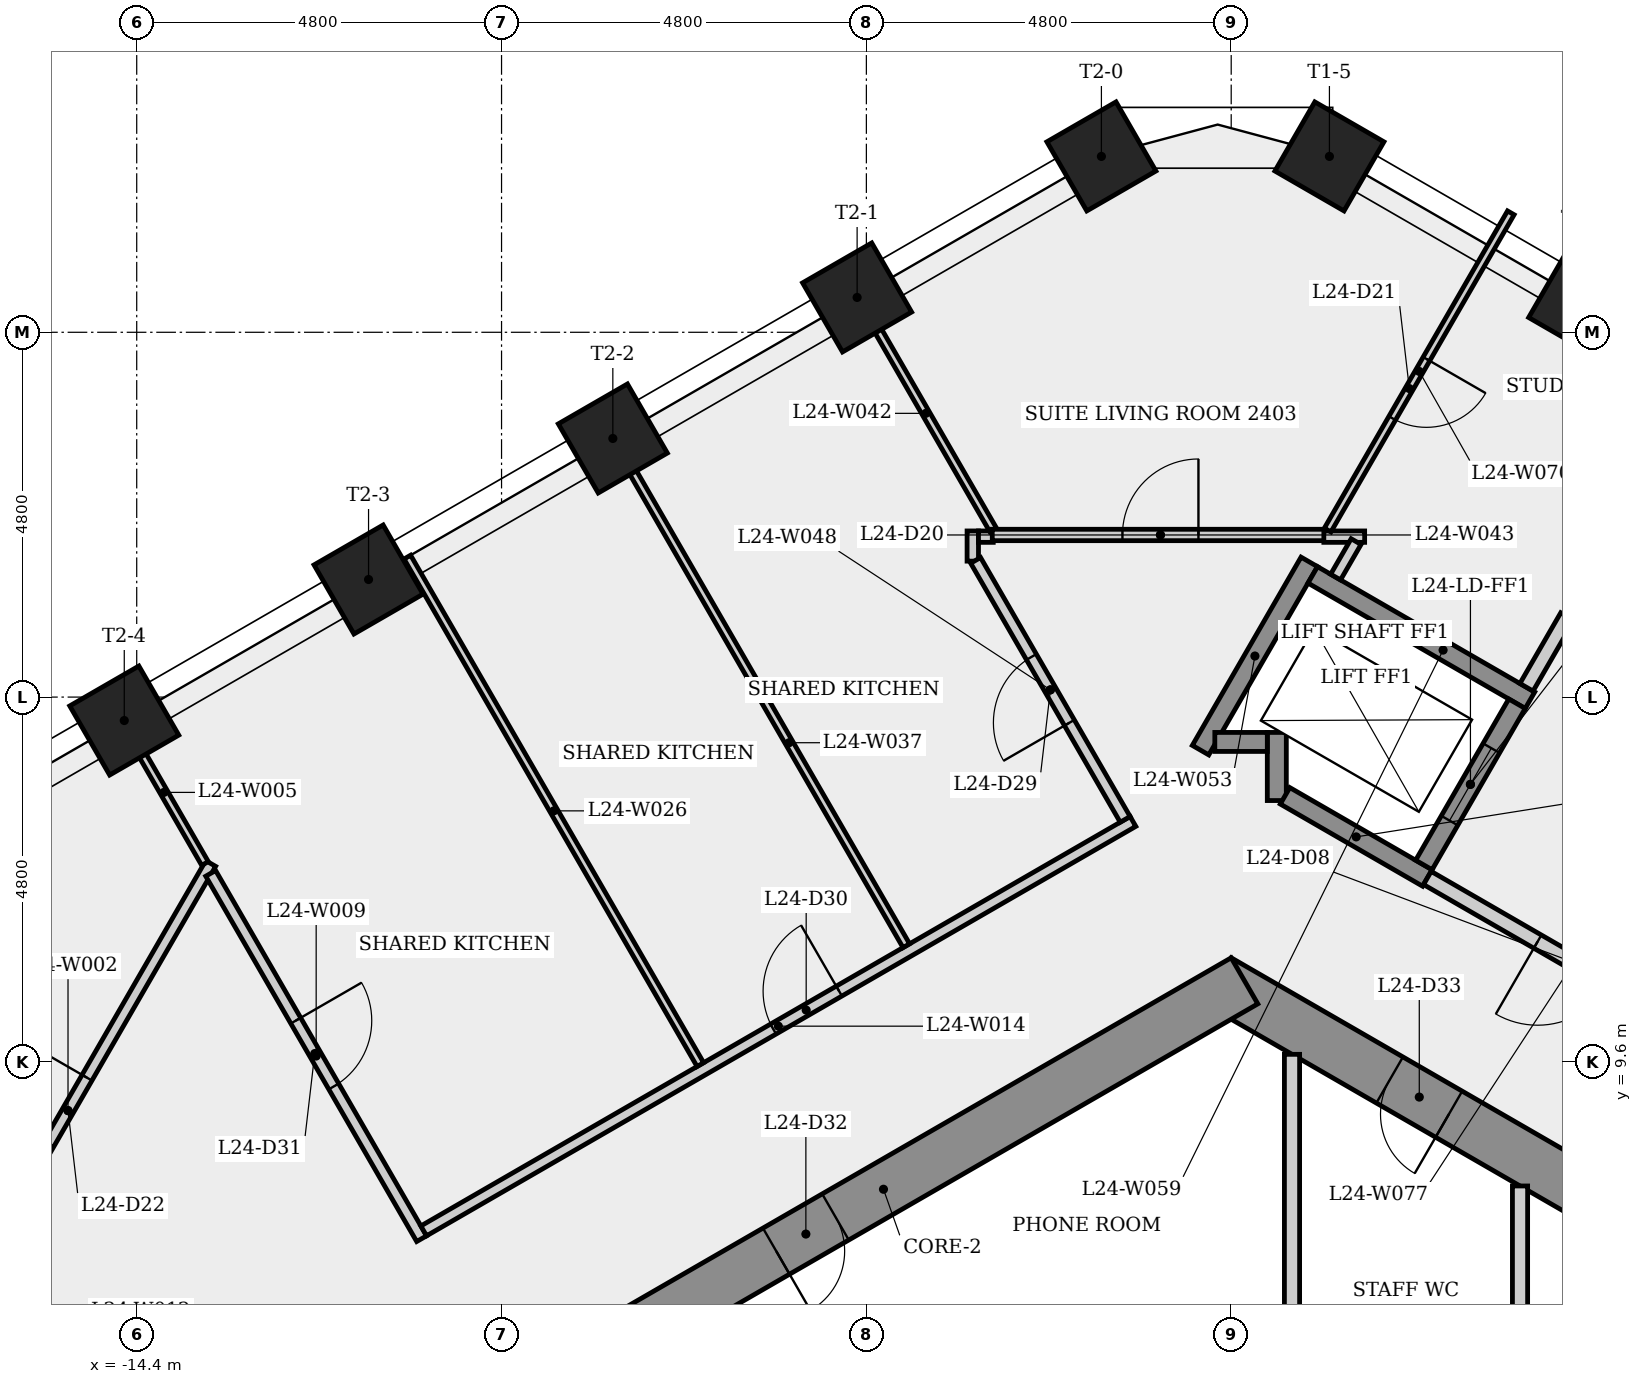
"""IFC4 building model, lengths in metres.
Left out: names, types, materials, properties, quantities, classifications, styles, units other than length and angle.
Written with IfcOpenShell. Run it as: python <this file> out.ifc"""

import sys

from ifc_helpers import new_model, si_unit, direction, frame, frame_2d, origin, origin_2d, place, context, subcontext, project, spatial, rectangle, extrude, element, fill, save


model = new_model("IFC4")
c1 = context("Model", 3, precision=1e-05, world=origin(), true_north=direction((0.0, 1.0)))
c2 = subcontext(c1, "Body", "Model", "MODEL_VIEW")
j1 = project(units=[si_unit("LENGTHUNIT", "METRE"), si_unit("PLANEANGLEUNIT", "RADIAN")], contexts=[c1])
p1 = place(None, origin())
s1 = spatial("IfcSite", under=j1, at=p1, CompositionType="ELEMENT")
p2 = place(p1, origin())
s2 = spatial("IfcBuilding", under=s1, at=p2, CompositionType="ELEMENT")
p3 = place(p2, frame((0.0, 0.0, 93.3)))
s3 = spatial("IfcBuildingStorey", under=s2, at=p3, CompositionType="ELEMENT", Elevation=93.3)
p4 = place(p3, frame((9.325, 5.182, 0.0), z_axis=(0.0, 0.0, 1.0), x_axis=(-0.866023993627, 0.500002442456, 0.0)))
e1 = element("IfcWall", 1, at=p4, inside=s3, PredefinedType="SHEAR", context=c2, shape_type="SweptSolid", body=[
    extrude(rectangle(XDim=10.97, YDim=0.7, at=frame_2d((5.485, 0.0))), origin(), (0.0, 0.0, 1.0), 3.4),
])
p5 = place(p4, frame((7.46, 0.0, 0.0)))
e2 = element("IfcOpeningElement", 2, at=p5, cuts=e1, PredefinedType="OPENING", context=c2, shape_type="SweptSolid", body=[
    extrude(rectangle(XDim=0.9, YDim=2.1, at=frame_2d((0.45, 1.05))), frame((0.0, 0.36, 0.0), z_axis=(0.0, -1.0, 0.0), x_axis=(1.0, 0.0, 0.0)), (0.0, 0.0, 1.0), 0.72),
])
p6 = place(p4, frame((1.201, 0.0, 0.0)))
e3 = element("IfcOpeningElement", 3, at=p6, cuts=e1, PredefinedType="OPENING", context=c2, shape_type="SweptSolid", body=[
    extrude(rectangle(XDim=0.9, YDim=2.1, at=frame_2d((0.45, 1.05))), frame((0.0, 0.36, 0.0), z_axis=(0.0, -1.0, 0.0), x_axis=(1.0, 0.0, 0.0)), (0.0, 0.0, 1.0), 0.72),
])
p7 = place(p3, frame((0.175, 10.667, 0.0), z_axis=(0.0, 0.0, 1.0), x_axis=(-0.866023993627, -0.500002442456, 0.0)))
e4 = element("IfcWall", 4, at=p7, inside=s3, PredefinedType="SHEAR", context=c2, shape_type="SweptSolid", body=[
    extrude(rectangle(XDim=10.97, YDim=0.7, at=frame_2d((5.485, 0.0))), origin(), (0.0, 0.0, 1.0), 3.4),
])
p8 = place(p7, frame((6.214, 0.0, 0.0)))
e5 = element("IfcOpeningElement", 5, at=p8, cuts=e4, PredefinedType="OPENING", context=c2, shape_type="SweptSolid", body=[
    extrude(rectangle(XDim=0.9, YDim=2.1, at=frame_2d((0.45, 1.05))), frame((0.0, 0.36, 0.0), z_axis=(0.0, -1.0, 0.0), x_axis=(1.0, 0.0, 0.0)), (0.0, 0.0, 1.0), 0.72),
])
for number, where, z_axis, x_axis in (
    (6, (4.631, 19.586, 0.0), (0.0, 0.0, 1.0), (0.5, 0.866, 0.0)),
    (7, (1.292, 21.514, 0.0), (0.0, 0.0, 1.0), (0.5, 0.866, 0.0)),
    (8, (-1.708, 21.514, 0.0), (0.0, 0.0, 1.0), (-0.5, 0.866, 0.0)),
    (9, (-4.922, 19.658, 0.0), (0.0, 0.0, 1.0), (-0.5, 0.866, 0.0)),
    (10, (-8.136, 17.803, 0.0), (0.0, 0.0, 1.0), (-0.5, 0.866, 0.0)),
    (11, (-11.35, 15.947, 0.0), (0.0, 0.0, 1.0), (-0.5, 0.866, 0.0)),
    (12, (-14.564, 14.092, 0.0), (0.0, 0.0, 1.0), (-0.5, 0.866, 0.0)),
):
    element("IfcColumn", number, at=place(p3, frame(where, z_axis=z_axis, x_axis=x_axis)), inside=s3, PredefinedType="COLUMN", context=c2, shape_type="SweptSolid", body=[
        extrude(rectangle(XDim=1.05, YDim=1.05, at=origin_2d()), origin(), (0.0, 0.0, 1.0), 3.4),
    ])
p9 = place(p3, frame((-17.181, 5.708, 0.0), z_axis=(0.0, 0.0, 1.0), x_axis=(0.50000294753, 0.86602370202, 0.0)))
e13 = element("IfcWall", 13, at=p9, inside=s3, PredefinedType="PARTITIONING", context=c2, shape_type="SweptSolid", body=[
    extrude(rectangle(XDim=7.509, YDim=0.15, at=frame_2d((3.755, 0.0))), origin(), (0.0, 0.0, 1.0), 3.05),
])
p10 = place(p9, frame((3.255, 0.0, 0.0)))
e14 = element("IfcOpeningElement", 14, at=p10, cuts=e13, PredefinedType="OPENING", context=c2, shape_type="SweptSolid", body=[
    extrude(rectangle(XDim=1.0, YDim=2.1, at=frame_2d((0.5, 1.05))), frame((0.0, 0.085, 0.0), z_axis=(0.0, -1.0, 0.0), x_axis=(1.0, 0.0, 0.0)), (0.0, 0.0, 1.0), 0.17),
])
p11 = place(p3, frame((-14.582, 14.081, 0.0), z_axis=(0.0, 0.0, 1.0), x_axis=(0.49994423739, -0.866057595949, 0.0)))
e15 = element("IfcWall", 15, at=p11, inside=s3, PredefinedType="PARTITIONING", context=c2, shape_type="SweptSolid", body=[
    extrude(rectangle(XDim=2.16, YDim=0.1, at=frame_2d((1.08, 0.0))), origin(), (0.0, 0.0, 1.0), 3.05),
])
p12 = place(p3, frame((-13.427, 12.081, 0.0), z_axis=(0.0, 0.0, 1.0), x_axis=(0.499966127528, -0.866044959182, 0.0)))
e16 = element("IfcWall", 16, at=p12, inside=s3, PredefinedType="PARTITIONING", context=c2, shape_type="SweptSolid", body=[
    extrude(rectangle(XDim=5.551, YDim=0.15, at=frame_2d((2.775, 0.0))), origin(), (0.0, 0.0, 1.0), 3.05),
])
p13 = place(p12, frame((2.238, 0.0, 0.0)))
e17 = element("IfcOpeningElement", 17, at=p13, cuts=e16, PredefinedType="OPENING", context=c2, shape_type="SweptSolid", body=[
    extrude(rectangle(XDim=1.0, YDim=2.1, at=frame_2d((0.5, 1.05))), frame((0.0, 0.085, 0.0), z_axis=(0.0, -1.0, 0.0), x_axis=(1.0, 0.0, 0.0)), (0.0, 0.0, 1.0), 0.17),
])
p14 = place(p3, frame((-10.624, 7.376, 0.0), z_axis=(0.0, 0.0, 1.0), x_axis=(0.86602446816, 0.500001620546, 0.0)))
e18 = element("IfcWall", 18, at=p14, inside=s3, PredefinedType="PARTITIONING", context=c2, shape_type="SweptSolid", body=[
    extrude(rectangle(XDim=10.775, YDim=0.15, at=frame_2d((5.387, 0.0))), origin(), (0.0, 0.0, 1.0), 3.05),
])
p15 = place(p14, frame((5.31, 0.0, 0.0)))
e19 = element("IfcOpeningElement", 19, at=p15, cuts=e18, PredefinedType="OPENING", context=c2, shape_type="SweptSolid", body=[
    extrude(rectangle(XDim=1.0, YDim=2.1, at=frame_2d((0.5, 1.05))), frame((0.0, 0.085, 0.0), z_axis=(0.0, -1.0, 0.0), x_axis=(1.0, 0.0, 0.0)), (0.0, 0.0, 1.0), 0.17),
])
for number, where, z_axis, x_axis in (
    (20, (-6.984, 9.564, 0.0), (0.0, 0.0, 1.0), (-0.5, 0.866, 0.0)),
    (21, (-4.275, 11.129, 0.0), (0.0, 0.0, 1.0), (-0.5, 0.866, 0.0)),
):
    element("IfcWall", number, at=place(p3, frame(where, z_axis=z_axis, x_axis=x_axis)), inside=s3, PredefinedType="PARTITIONING", context=c2, shape_type="SweptSolid", body=[
        extrude(rectangle(XDim=7.71, YDim=0.1, at=frame_2d((3.855, 0.0))), origin(), (0.0, 0.0, 1.0), 3.05),
    ])
p16 = place(p3, frame((-3.4, 16.189, 0.0), z_axis=(0.0, 0.0, 1.0), x_axis=(0.0, 1.0, 0.0)))
e22 = element("IfcWall", 22, at=p16, inside=s3, PredefinedType="PARTITIONING", context=c2, shape_type="SweptSolid", body=[
    extrude(rectangle(XDim=0.397, YDim=0.15, at=frame_2d((0.199, 0.0))), origin(), (0.0, 0.0, 1.0), 3.05),
])
p17 = place(p3, frame((-3.325, 16.511, 0.0), z_axis=(0.0, 0.0, 1.0), x_axis=(1.0, 0.0, 0.0)))
e23 = element("IfcWall", 23, at=p17, inside=s3, PredefinedType="PARTITIONING", context=c2, shape_type="SweptSolid", body=[
    extrude(rectangle(XDim=0.194, YDim=0.15, at=frame_2d((0.097, 0.0))), origin(), (0.0, 0.0, 1.0), 3.05),
])
p18 = place(p3, frame((-3.131, 16.598, 0.0), z_axis=(0.0, 0.0, 1.0), x_axis=(-0.499982733475, 0.866035372388, 0.0)))
e24 = element("IfcWall", 24, at=p18, inside=s3, PredefinedType="PARTITIONING", context=c2, shape_type="SweptSolid", body=[
    extrude(rectangle(XDim=3.546, YDim=0.1, at=frame_2d((1.773, 0.0))), origin(), (0.0, 0.0, 1.0), 3.05),
])
p19 = place(p3, frame((-3.144, 16.533, 0.0), z_axis=(0.0, 0.0, 1.0), x_axis=(1.0, 0.0, 0.0)))
e25 = element("IfcWall", 25, at=p19, inside=s3, PredefinedType="PARTITIONING", context=c2, shape_type="SweptSolid", body=[
    extrude(rectangle(XDim=4.425, YDim=0.15, at=frame_2d((2.212, 0.0))), origin(), (0.0, 0.0, 1.0), 3.05),
])
p20 = place(p19, frame((1.713, 0.0, 0.0)))
e26 = element("IfcOpeningElement", 26, at=p20, cuts=e25, PredefinedType="OPENING", context=c2, shape_type="SweptSolid", body=[
    extrude(rectangle(XDim=1.0, YDim=2.1, at=frame_2d((0.5, 1.05))), frame((0.0, 0.085, 0.0), z_axis=(0.0, -1.0, 0.0), x_axis=(1.0, 0.0, 0.0)), (0.0, 0.0, 1.0), 0.17),
])
p21 = place(p3, frame((-1.395, 12.791, 0.0), z_axis=(0.0, 0.0, 1.0), x_axis=(-0.500016051241, 0.866016136398, 0.0)))
e27 = element("IfcWall", 27, at=p21, inside=s3, PredefinedType="PARTITIONING", context=c2, shape_type="SweptSolid", body=[
    extrude(rectangle(XDim=3.935, YDim=0.15, at=frame_2d((1.967, 0.0))), origin(), (0.0, 0.0, 1.0), 3.05),
])
p22 = place(p21, frame((1.467, 0.0, 0.0)))
e28 = element("IfcOpeningElement", 28, at=p22, cuts=e27, PredefinedType="OPENING", context=c2, shape_type="SweptSolid", body=[
    extrude(rectangle(XDim=1.0, YDim=2.1, at=frame_2d((0.5, 1.05))), frame((0.0, 0.085, 0.0), z_axis=(0.0, -1.0, 0.0), x_axis=(1.0, 0.0, 0.0)), (0.0, 0.0, 1.0), 0.17),
])
p23 = place(p3, frame((-0.403, 13.702, 0.0), z_axis=(0.0, 0.0, 1.0), x_axis=(0.499976111731, 0.866039195244, 0.0)))
e29 = element("IfcWall", 29, at=p23, inside=s3, PredefinedType="SHEAR", context=c2, shape_type="SweptSolid", body=[
    extrude(rectangle(XDim=2.861, YDim=0.25, at=frame_2d((1.43, 0.0))), origin(), (0.0, 0.0, 1.0), 3.05),
])
p24 = place(p3, frame((0.6, 13.039, 0.0), z_axis=(0.0, 0.0, 1.0), x_axis=(0.0, 1.0, 0.0)))
e30 = element("IfcWall", 30, at=p24, inside=s3, PredefinedType="SHEAR", context=c2, shape_type="SweptSolid", body=[
    extrude(rectangle(XDim=0.896, YDim=0.25, at=frame_2d((0.448, 0.0))), origin(), (0.0, 0.0, 1.0), 3.05),
])
p25 = place(p3, frame((0.475, 13.81, 0.0), z_axis=(0.0, 0.0, 1.0), x_axis=(-1.0, 0.0, 0.0)))
e31 = element("IfcWall", 31, at=p25, inside=s3, PredefinedType="SHEAR", context=c2, shape_type="SweptSolid", body=[
    extrude(rectangle(XDim=0.691, YDim=0.25, at=frame_2d((0.345, 0.0))), origin(), (0.0, 0.0, 1.0), 3.4),
])
p26 = place(p3, frame((0.8, 9.699, 0.0), z_axis=(0.0, 0.0, 1.0), x_axis=(0.0, -1.0, 0.0)))
e32 = element("IfcWall", 32, at=p26, inside=s3, PredefinedType="PARTITIONING", context=c2, shape_type="SweptSolid", body=[
    extrude(rectangle(XDim=4.425, YDim=0.2, at=frame_2d((2.212, 0.0))), origin(), (0.0, 0.0, 1.0), 3.05),
])
p27 = place(p3, frame((1.073, 16.008, 0.0), z_axis=(0.0, 0.0, 1.0), x_axis=(0.866040211805, -0.499974350878, 0.0)))
e33 = element("IfcWall", 33, at=p27, inside=s3, PredefinedType="SHEAR", context=c2, shape_type="SweptSolid", body=[
    extrude(rectangle(XDim=3.3, YDim=0.25, at=frame_2d((1.65, 0.0))), origin(), (0.0, 0.0, 1.0), 3.05),
])
p28 = place(p3, frame((1.219, 16.511, 0.0), z_axis=(0.0, 0.0, 1.0), x_axis=(1.0, 0.0, 0.0)))
e34 = element("IfcWall", 34, at=p28, inside=s3, PredefinedType="PARTITIONING", context=c2, shape_type="SweptSolid", body=[
    extrude(rectangle(XDim=0.537, YDim=0.15, at=frame_2d((0.269, 0.0))), origin(), (0.0, 0.0, 1.0), 3.05),
])
p29 = place(p3, frame((1.643, 16.446, 0.0), z_axis=(0.0, 0.0, 1.0), x_axis=(-0.500179556555, -0.865921711937, 0.0)))
e35 = element("IfcWall", 35, at=p29, inside=s3, PredefinedType="PARTITIONING", context=c2, shape_type="SweptSolid", body=[
    extrude(rectangle(XDim=0.539, YDim=0.15, at=frame_2d((0.27, 0.0))), origin(), (0.0, 0.0, 1.0), 3.05),
])
p30 = place(p3, frame((2.581, 12.02, 0.0), z_axis=(0.0, 0.0, 1.0), x_axis=(-0.86603892542, 0.499976579108, 0.0)))
e36 = element("IfcWall", 36, at=p30, inside=s3, PredefinedType="SHEAR", context=c2, shape_type="SweptSolid", body=[
    extrude(rectangle(XDim=2.162, YDim=0.25, at=frame_2d((1.081, 0.0))), origin(), (0.0, 0.0, 1.0), 3.05),
])
p31 = place(p3, frame((2.535, 12.191, 0.0), z_axis=(0.0, 0.0, 1.0), x_axis=(0.500061746146, 0.865989751695, 0.0)))
e37 = element("IfcWall", 37, at=p31, inside=s3, PredefinedType="SHEAR", context=c2, shape_type="SweptSolid", body=[
    extrude(rectangle(XDim=2.45, YDim=0.25, at=frame_2d((1.225, 0.0))), origin(), (0.0, 0.0, 1.0), 3.4),
])
p32 = place(p31, frame((0.675, 0.0, 0.0)))
e38 = element("IfcOpeningElement", 38, at=p32, cuts=e37, PredefinedType="OPENING", context=c2, shape_type="SweptSolid", body=[
    extrude(rectangle(XDim=1.1, YDim=2.1, at=frame_2d((0.55, 1.05))), frame((0.0, 0.135, 0.0), z_axis=(0.0, -1.0, 0.0), x_axis=(1.0, 0.0, 0.0)), (0.0, 0.0, 1.0), 0.27),
])
p33 = place(p3, frame((3.679, 20.772, 0.0), z_axis=(0.0, 0.0, 1.0), x_axis=(-0.500023547092, -0.866011808438, 0.0)))
e39 = element("IfcWall", 39, at=p33, inside=s3, PredefinedType="PARTITIONING", context=c2, shape_type="SweptSolid", body=[
    extrude(rectangle(XDim=4.82, YDim=0.1, at=frame_2d((2.41, 0.0))), origin(), (0.0, 0.0, 1.0), 3.05),
])
p34 = place(p33, frame((2.22, 0.0, 0.0)))
e40 = element("IfcOpeningElement", 40, at=p34, cuts=e39, PredefinedType="OPENING", context=c2, shape_type="SweptSolid", body=[
    extrude(rectangle(XDim=0.9, YDim=2.1, at=frame_2d((0.45, 1.05))), frame((0.0, 0.06, 0.0), z_axis=(0.0, -1.0, 0.0), x_axis=(1.0, 0.0, 0.0)), (0.0, 0.0, 1.0), 0.12),
])
p35 = place(p3, frame((3.8, 7.967, 0.0), z_axis=(0.0, 0.0, 1.0), x_axis=(0.0, -1.0, 0.0)))
e41 = element("IfcWall", 41, at=p35, inside=s3, PredefinedType="PARTITIONING", context=c2, shape_type="SweptSolid", body=[
    extrude(rectangle(XDim=2.692, YDim=0.2, at=frame_2d((1.346, 0.0))), origin(), (0.0, 0.0, 1.0), 3.05),
])
p36 = place(p3, frame((3.885, 14.529, 0.0), z_axis=(0.0, 0.0, 1.0), x_axis=(0.499997628298, 0.866026773083, 0.0)))
e42 = element("IfcWall", 42, at=p36, inside=s3, PredefinedType="PARTITIONING", context=c2, shape_type="SweptSolid", body=[
    extrude(rectangle(XDim=1.075, YDim=0.2, at=frame_2d((0.538, 0.0))), origin(), (0.0, 0.0, 1.0), 3.05),
])
p37 = place(p3, frame((6.435, 9.795, 0.0), z_axis=(0.0, 0.0, 1.0), x_axis=(-0.866012907634, 0.500021643343, 0.0)))
e43 = element("IfcWall", 43, at=p37, inside=s3, PredefinedType="PARTITIONING", context=c2, shape_type="SweptSolid", body=[
    extrude(rectangle(XDim=4.45, YDim=0.2, at=frame_2d((2.225, 0.0))), origin(), (0.0, 0.0, 1.0), 3.05),
])
p38 = place(p37, frame((1.675, 0.0, 0.0)))
e44 = element("IfcOpeningElement", 44, at=p38, cuts=e43, PredefinedType="OPENING", context=c2, shape_type="SweptSolid", body=[
    extrude(rectangle(XDim=1.1, YDim=2.1, at=frame_2d((0.55, 1.05))), frame((0.0, 0.11, 0.0), z_axis=(0.0, -1.0, 0.0), x_axis=(1.0, 0.0, 0.0)), (0.0, 0.0, 1.0), 0.22),
])
p39 = place(p38, origin())
e45 = element("IfcDoor", 45, at=p39, inside=s3, OperationType="SINGLE_SWING_RIGHT", PredefinedType="DOOR", context=c2, shape_type="SweptSolid", body=[
    extrude(rectangle(XDim=1.1, YDim=2.1, at=frame_2d((0.55, 1.05))), frame((0.0, 0.025, 0.0), z_axis=(0.0, -1.0, 0.0), x_axis=(1.0, 0.0, 0.0)), (0.0, 0.0, 1.0), 0.05),
])
fill(e44, e45)
p40 = place(p32, origin())
e46 = element("IfcDoor", 46, at=p40, inside=s3, OperationType="SLIDING_TO_LEFT", PredefinedType="DOOR", context=c2, shape_type="SweptSolid", body=[
    extrude(rectangle(XDim=1.1, YDim=2.1, at=frame_2d((0.55, 1.05))), frame((0.0, 0.025, 0.0), z_axis=(0.0, -1.0, 0.0), x_axis=(1.0, 0.0, 0.0)), (0.0, 0.0, 1.0), 0.05),
])
fill(e38, e46)
p41 = place(p20, origin())
e47 = element("IfcDoor", 47, at=p41, inside=s3, OperationType="SINGLE_SWING_RIGHT", PredefinedType="DOOR", context=c2, shape_type="SweptSolid", body=[
    extrude(rectangle(XDim=1.0, YDim=2.1, at=frame_2d((0.5, 1.05))), frame((0.0, 0.025, 0.0), z_axis=(0.0, -1.0, 0.0), x_axis=(1.0, 0.0, 0.0)), (0.0, 0.0, 1.0), 0.05),
])
fill(e26, e47)
p42 = place(p34, origin())
e48 = element("IfcDoor", 48, at=p42, inside=s3, OperationType="SINGLE_SWING_LEFT", PredefinedType="DOOR", context=c2, shape_type="SweptSolid", body=[
    extrude(rectangle(XDim=0.9, YDim=2.1, at=frame_2d((0.45, 1.05))), frame((0.0, 0.025, 0.0), z_axis=(0.0, -1.0, 0.0), x_axis=(1.0, 0.0, 0.0)), (0.0, 0.0, 1.0), 0.05),
])
fill(e40, e48)
p43 = place(p10, origin())
e49 = element("IfcDoor", 49, at=p43, inside=s3, OperationType="SINGLE_SWING_RIGHT", PredefinedType="DOOR", context=c2, shape_type="SweptSolid", body=[
    extrude(rectangle(XDim=1.0, YDim=2.1, at=frame_2d((0.5, 1.05))), frame((0.0, 0.025, 0.0), z_axis=(0.0, -1.0, 0.0), x_axis=(1.0, 0.0, 0.0)), (0.0, 0.0, 1.0), 0.05),
])
fill(e14, e49)
p44 = place(p22, origin())
e50 = element("IfcDoor", 50, at=p44, inside=s3, OperationType="SINGLE_SWING_LEFT", PredefinedType="DOOR", context=c2, shape_type="SweptSolid", body=[
    extrude(rectangle(XDim=1.0, YDim=2.1, at=frame_2d((0.5, 1.05))), frame((0.0, 0.025, 0.0), z_axis=(0.0, -1.0, 0.0), x_axis=(1.0, 0.0, 0.0)), (0.0, 0.0, 1.0), 0.05),
])
fill(e28, e50)
p45 = place(p15, origin())
e51 = element("IfcDoor", 51, at=p45, inside=s3, OperationType="SINGLE_SWING_RIGHT", PredefinedType="DOOR", context=c2, shape_type="SweptSolid", body=[
    extrude(rectangle(XDim=1.0, YDim=2.1, at=frame_2d((0.5, 1.05))), frame((0.0, 0.025, 0.0), z_axis=(0.0, -1.0, 0.0), x_axis=(1.0, 0.0, 0.0)), (0.0, 0.0, 1.0), 0.05),
])
fill(e19, e51)
p46 = place(p13, origin())
e52 = element("IfcDoor", 52, at=p46, inside=s3, OperationType="SINGLE_SWING_LEFT", PredefinedType="DOOR", context=c2, shape_type="SweptSolid", body=[
    extrude(rectangle(XDim=1.0, YDim=2.1, at=frame_2d((0.5, 1.05))), frame((0.0, 0.025, 0.0), z_axis=(0.0, -1.0, 0.0), x_axis=(1.0, 0.0, 0.0)), (0.0, 0.0, 1.0), 0.05),
])
fill(e17, e52)
p47 = place(p8, origin())
e53 = element("IfcDoor", 53, at=p47, inside=s3, OperationType="SINGLE_SWING_RIGHT", PredefinedType="DOOR", context=c2, shape_type="SweptSolid", body=[
    extrude(rectangle(XDim=0.9, YDim=2.1, at=frame_2d((0.45, 1.05))), frame((0.0, 0.025, 0.0), z_axis=(0.0, -1.0, 0.0), x_axis=(1.0, 0.0, 0.0)), (0.0, 0.0, 1.0), 0.05),
])
fill(e5, e53)
p48 = place(p5, origin())
e54 = element("IfcDoor", 54, at=p48, inside=s3, OperationType="SINGLE_SWING_LEFT", PredefinedType="DOOR", context=c2, shape_type="SweptSolid", body=[
    extrude(rectangle(XDim=0.9, YDim=2.1, at=frame_2d((0.45, 1.05))), frame((0.0, 0.025, 0.0), z_axis=(0.0, -1.0, 0.0), x_axis=(1.0, 0.0, 0.0)), (0.0, 0.0, 1.0), 0.05),
])
fill(e2, e54)
save(model, sys.argv[1])
